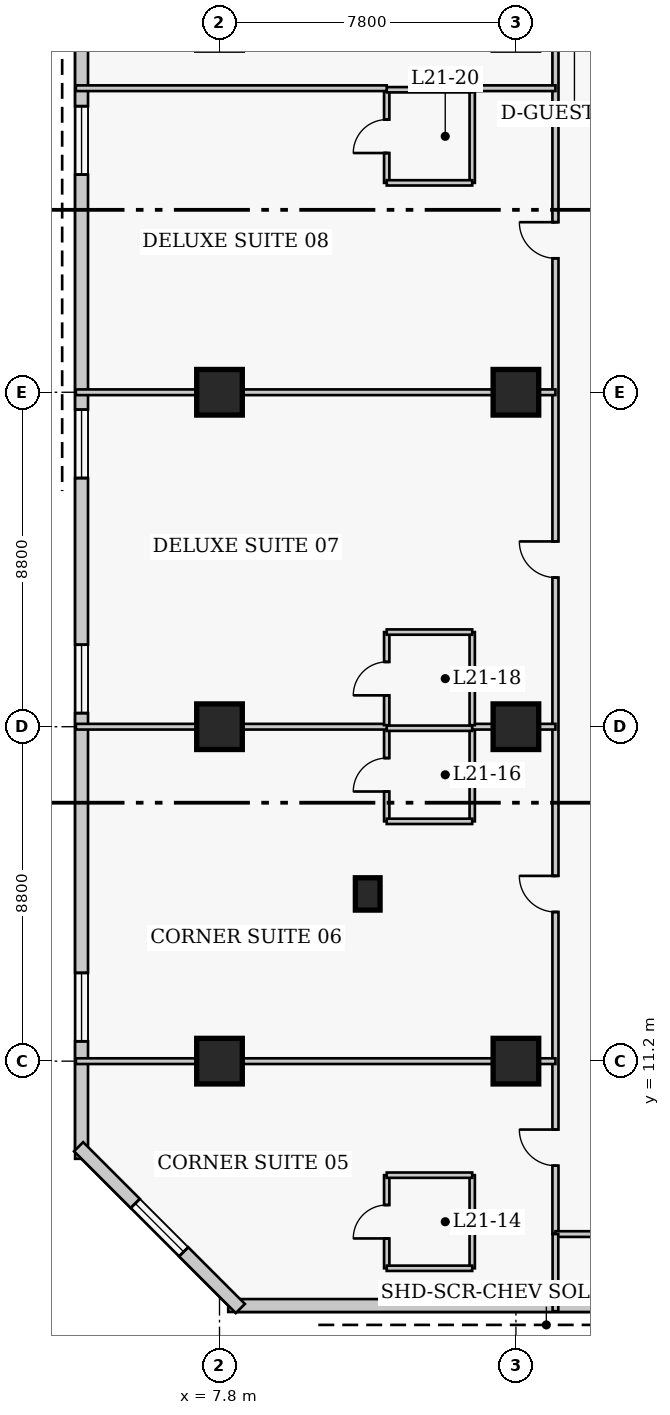
"""IFC4 building model, lengths in metres.
Left out: names, types, materials, properties, quantities, classifications, styles, units other than length and angle.
Written with IfcOpenShell. Run it as: python <this file> out.ifc"""

import sys

from ifc_helpers import new_model, si_unit, direction, frame, frame_2d, origin, origin_2d, place, context, subcontext, project, spatial, rectangle, extrude, element, fill, save


model = new_model("IFC4")
c1 = context("Model", 3, precision=1e-05, world=origin(), true_north=direction((0.0, 1.0)))
c2 = subcontext(c1, "Body", "Model", "MODEL_VIEW")
j1 = project(units=[si_unit("LENGTHUNIT", "METRE"), si_unit("PLANEANGLEUNIT", "RADIAN")], contexts=[c1])
p1 = place(None, origin())
s1 = spatial("IfcSite", under=j1, at=p1, CompositionType="ELEMENT")
p2 = place(p1, origin())
s2 = spatial("IfcBuilding", under=s1, at=p2, CompositionType="ELEMENT")
p3 = place(p2, frame((0.0, 0.0, 88.0)))
s3 = spatial("IfcBuildingStorey", under=s2, at=p3, CompositionType="ELEMENT", Elevation=88.0)
for number, where, z_axis, x_axis in (
    (1, (7.8, 11.2, 0.0), (0.0, 0.0, 1.0), (1.0, 0.0, 0.0)),
    (2, (7.8, 20.0, 0.0), (0.0, 0.0, 1.0), (1.0, 0.0, 0.0)),
    (3, (7.8, 28.8, 0.0), (0.0, 0.0, 1.0), (1.0, 0.0, 0.0)),
    (4, (15.6, 11.2, 0.0), (0.0, 0.0, 1.0), (1.0, 0.0, 0.0)),
    (5, (15.6, 20.0, 0.0), (0.0, 0.0, 1.0), (1.0, 0.0, 0.0)),
    (6, (15.6, 28.8, 0.0), (0.0, 0.0, 1.0), (1.0, 0.0, 0.0)),
):
    element("IfcColumn", number, at=place(p3, frame(where, z_axis=z_axis, x_axis=x_axis)), inside=s3, PredefinedType="COLUMN", context=c2, shape_type="SweptSolid", body=[
        extrude(rectangle(XDim=1.2, YDim=1.2, at=origin_2d()), origin(), (0.0, 0.0, 1.0), 3.8),
    ])
p4 = place(p3, frame((11.7, 15.6, 0.0), z_axis=(0.0, 0.0, 1.0), x_axis=(1.0, 0.0, 0.0)))
e7 = element("IfcColumn", 7, at=p4, inside=s3, PredefinedType="PILASTER", context=c2, shape_type="SweptSolid", body=[
    extrude(rectangle(XDim=0.65, YDim=0.85, at=origin_2d()), origin(), (0.0, 0.0, 1.0), 3.8),
])
p5 = place(p3, frame((8.03, 4.77, 0.0), z_axis=(0.0, 0.0, 1.0), x_axis=(1.0, 0.0, 0.0)))
e8 = element("IfcWall", 8, at=p5, inside=s3, PredefinedType="SOLIDWALL", context=c2, shape_type="SweptSolid", body=[
    extrude(rectangle(XDim=28.29, YDim=0.34, at=frame_2d((14.145, 0.0))), origin(), (0.0, 0.0, 1.0), 3.54),
])
p6 = place(p5, frame((12.595, 0.0, 0.85)))
e9 = element("IfcOpeningElement", 9, at=p6, cuts=e8, PredefinedType="OPENING", context=c2, shape_type="SweptSolid", body=[
    extrude(rectangle(XDim=1.8, YDim=1.8, at=frame_2d((0.9, 0.9))), frame((0.0, 0.18, 0.0), z_axis=(0.0, -1.0, 0.0), x_axis=(1.0, 0.0, 0.0)), (0.0, 0.0, 1.0), 0.36),
])
p7 = place(p5, frame((18.66, 0.0, 0.85)))
e10 = element("IfcOpeningElement", 10, at=p7, cuts=e8, PredefinedType="OPENING", context=c2, shape_type="SweptSolid", body=[
    extrude(rectangle(XDim=1.3, YDim=1.7, at=frame_2d((0.65, 0.85))), frame((0.0, 0.18, 0.0), z_axis=(0.0, -1.0, 0.0), x_axis=(1.0, 0.0, 0.0)), (0.0, 0.0, 1.0), 0.36),
])
p8 = place(p3, frame((4.17, 40.57, 0.0), z_axis=(0.0, 0.0, 1.0), x_axis=(0.0, -1.0, 0.0)))
e11 = element("IfcWall", 11, at=p8, inside=s3, PredefinedType="SOLIDWALL", context=c2, shape_type="SweptSolid", body=[
    extrude(rectangle(XDim=31.94, YDim=0.34, at=frame_2d((15.97, 0.0))), origin(), (0.0, 0.0, 1.0), 3.54),
])
p9 = place(p8, frame((4.242, 0.0, 0.85)))
e12 = element("IfcOpeningElement", 12, at=p9, cuts=e11, PredefinedType="OPENING", context=c2, shape_type="SweptSolid", body=[
    extrude(rectangle(XDim=1.8, YDim=1.8, at=frame_2d((0.9, 0.9))), frame((0.0, 0.18, 0.0), z_axis=(0.0, -1.0, 0.0), x_axis=(1.0, 0.0, 0.0)), (0.0, 0.0, 1.0), 0.36),
])
p10 = place(p8, frame((12.228, 0.0, 0.85)))
e13 = element("IfcOpeningElement", 13, at=p10, cuts=e11, PredefinedType="OPENING", context=c2, shape_type="SweptSolid", body=[
    extrude(rectangle(XDim=1.8, YDim=1.8, at=frame_2d((0.9, 0.9))), frame((0.0, 0.18, 0.0), z_axis=(0.0, -1.0, 0.0), x_axis=(1.0, 0.0, 0.0)), (0.0, 0.0, 1.0), 0.36),
])
p11 = place(p8, frame((18.413, 0.0, 0.85)))
e14 = element("IfcOpeningElement", 14, at=p11, cuts=e11, PredefinedType="OPENING", context=c2, shape_type="SweptSolid", body=[
    extrude(rectangle(XDim=1.8, YDim=1.8, at=frame_2d((0.9, 0.9))), frame((0.0, 0.18, 0.0), z_axis=(0.0, -1.0, 0.0), x_axis=(1.0, 0.0, 0.0)), (0.0, 0.0, 1.0), 0.36),
])
p12 = place(p8, frame((27.048, 0.0, 0.85)))
e15 = element("IfcOpeningElement", 15, at=p12, cuts=e11, PredefinedType="OPENING", context=c2, shape_type="SweptSolid", body=[
    extrude(rectangle(XDim=1.8, YDim=1.8, at=frame_2d((0.9, 0.9))), frame((0.0, 0.18, 0.0), z_axis=(0.0, -1.0, 0.0), x_axis=(1.0, 0.0, 0.0)), (0.0, 0.0, 1.0), 0.36),
])
p13 = place(p3, frame((4.092, 8.948, 0.0), z_axis=(0.0, 0.0, 1.0), x_axis=(0.707106781187, -0.707106781187, 0.0)))
e16 = element("IfcWall", 16, at=p13, inside=s3, PredefinedType="SOLIDWALL", context=c2, shape_type="SweptSolid", body=[
    extrude(rectangle(XDim=6.02, YDim=0.34, at=frame_2d((3.01, 0.0))), origin(), (0.0, 0.0, 1.0), 3.54),
])
p14 = place(p13, frame((2.11, 0.0, 0.85)))
e17 = element("IfcOpeningElement", 17, at=p14, cuts=e16, PredefinedType="OPENING", context=c2, shape_type="SweptSolid", body=[
    extrude(rectangle(XDim=1.8, YDim=1.8, at=frame_2d((0.9, 0.9))), frame((0.0, 0.18, 0.0), z_axis=(0.0, -1.0, 0.0), x_axis=(1.0, 0.0, 0.0)), (0.0, 0.0, 1.0), 0.36),
])
p15 = place(p3, frame((16.64, 6.65, 0.0), z_axis=(0.0, 0.0, 1.0), x_axis=(0.0, 1.0, 0.0)))
e18 = element("IfcWall", 18, at=p15, inside=s3, PredefinedType="PARTITIONING", context=c2, shape_type="SweptSolid", body=[
    extrude(rectangle(XDim=34.0, YDim=0.16, at=frame_2d((17.0, 0.0))), origin(), (0.0, 0.0, 1.0), 3.54),
])
p16 = place(p15, frame((1.8, 0.0, 0.0)))
e19 = element("IfcOpeningElement", 19, at=p16, cuts=e18, PredefinedType="OPENING", context=c2, shape_type="SweptSolid", body=[
    extrude(rectangle(XDim=0.95, YDim=2.1, at=frame_2d((0.475, 1.05))), frame((0.0, 0.09, 0.0), z_axis=(0.0, -1.0, 0.0), x_axis=(1.0, 0.0, 0.0)), (0.0, 0.0, 1.0), 0.18),
])
p17 = place(p15, frame((8.475, 0.0, 0.0)))
e20 = element("IfcOpeningElement", 20, at=p17, cuts=e18, PredefinedType="OPENING", context=c2, shape_type="SweptSolid", body=[
    extrude(rectangle(XDim=0.95, YDim=2.1, at=frame_2d((0.475, 1.05))), frame((0.0, 0.09, 0.0), z_axis=(0.0, -1.0, 0.0), x_axis=(1.0, 0.0, 0.0)), (0.0, 0.0, 1.0), 0.18),
])
p18 = place(p15, frame((17.275, 0.0, 0.0)))
e21 = element("IfcOpeningElement", 21, at=p18, cuts=e18, PredefinedType="OPENING", context=c2, shape_type="SweptSolid", body=[
    extrude(rectangle(XDim=0.95, YDim=2.1, at=frame_2d((0.475, 1.05))), frame((0.0, 0.09, 0.0), z_axis=(0.0, -1.0, 0.0), x_axis=(1.0, 0.0, 0.0)), (0.0, 0.0, 1.0), 0.18),
])
p19 = place(p15, frame((25.675, 0.0, 0.0)))
e22 = element("IfcOpeningElement", 22, at=p19, cuts=e18, PredefinedType="OPENING", context=c2, shape_type="SweptSolid", body=[
    extrude(rectangle(XDim=0.95, YDim=2.1, at=frame_2d((0.475, 1.05))), frame((0.0, 0.09, 0.0), z_axis=(0.0, -1.0, 0.0), x_axis=(1.0, 0.0, 0.0)), (0.0, 0.0, 1.0), 0.18),
])
p20 = place(p15, frame((32.56, 0.0, 0.0)))
e23 = element("IfcOpeningElement", 23, at=p20, cuts=e18, PredefinedType="OPENING", context=c2, shape_type="SweptSolid", body=[
    extrude(rectangle(XDim=1.0, YDim=2.15, at=frame_2d((0.5, 1.075))), frame((0.0, 0.09, 0.0), z_axis=(0.0, -1.0, 0.0), x_axis=(1.0, 0.0, 0.0)), (0.0, 0.0, 1.0), 0.18),
])
p21 = place(p3, frame((16.64, 6.65, 0.0), z_axis=(0.0, 0.0, 1.0), x_axis=(1.0, 0.0, 0.0)))
e24 = element("IfcWall", 24, at=p21, inside=s3, PredefinedType="PARTITIONING", context=c2, shape_type="SweptSolid", body=[
    extrude(rectangle(XDim=2.22, YDim=0.15, at=frame_2d((1.11, 0.0))), origin(), (0.0, 0.0, 1.0), 3.54),
])
p22 = place(p3, frame((16.64, 4.62, 0.0), z_axis=(0.0, 0.0, 1.0), x_axis=(0.0, 1.0, 0.0)))
e25 = element("IfcWall", 25, at=p22, inside=s3, PredefinedType="PARTITIONING", context=c2, shape_type="SweptSolid", body=[
    extrude(rectangle(XDim=2.03, YDim=0.15, at=frame_2d((1.015, 0.0))), origin(), (0.0, 0.0, 1.0), 3.54),
])
p23 = place(p3, frame((12.2, 5.75, 0.0), z_axis=(0.0, 0.0, 1.0), x_axis=(0.0, 1.0, 0.0)))
e26 = element("IfcWall", 26, at=p23, inside=s3, PredefinedType="PLUMBINGWALL", context=c2, shape_type="SweptSolid", body=[
    extrude(rectangle(XDim=2.45, YDim=0.14, at=frame_2d((1.225, 0.0))), origin(), (0.0, 0.0, 1.0), 3.54),
])
p24 = place(p23, frame((0.785, 0.0, 0.0)))
e27 = element("IfcOpeningElement", 27, at=p24, cuts=e26, PredefinedType="OPENING", context=c2, shape_type="SweptSolid", body=[
    extrude(rectangle(XDim=0.88, YDim=2.05, at=frame_2d((0.44, 1.025))), frame((0.0, 0.08, 0.0), z_axis=(0.0, -1.0, 0.0), x_axis=(1.0, 0.0, 0.0)), (0.0, 0.0, 1.0), 0.16),
])
p25 = place(p3, frame((14.45, 5.75, 0.0), z_axis=(0.0, 0.0, 1.0), x_axis=(0.0, 1.0, 0.0)))
e28 = element("IfcWall", 28, at=p25, inside=s3, PredefinedType="PLUMBINGWALL", context=c2, shape_type="SweptSolid", body=[
    extrude(rectangle(XDim=2.45, YDim=0.14, at=frame_2d((1.225, 0.0))), origin(), (0.0, 0.0, 1.0), 3.54),
])
for number, where, z_axis, x_axis in (
    (29, (12.2, 5.75, 0.0), (0.0, 0.0, 1.0), (1.0, 0.0, 0.0)),
    (30, (12.2, 8.2, 0.0), (0.0, 0.0, 1.0), (1.0, 0.0, 0.0)),
):
    element("IfcWall", number, at=place(p3, frame(where, z_axis=z_axis, x_axis=x_axis)), inside=s3, PredefinedType="PLUMBINGWALL", context=c2, shape_type="SweptSolid", body=[
        extrude(rectangle(XDim=2.25, YDim=0.14, at=frame_2d((1.125, 0.0))), origin(), (0.0, 0.0, 1.0), 3.54),
    ])
p26 = place(p3, frame((4.02, 11.2, 0.0), z_axis=(0.0, 0.0, 1.0), x_axis=(1.0, 0.0, 0.0)))
e31 = element("IfcWall", 31, at=p26, inside=s3, PredefinedType="PARTITIONING", context=c2, shape_type="SweptSolid", body=[
    extrude(rectangle(XDim=12.62, YDim=0.15, at=frame_2d((6.31, 0.0))), origin(), (0.0, 0.0, 1.0), 2.679),
])
p27 = place(p3, frame((12.2, 17.51, 0.0), z_axis=(0.0, 0.0, 1.0), x_axis=(0.0, 1.0, 0.0)))
e32 = element("IfcWall", 32, at=p27, inside=s3, PredefinedType="PLUMBINGWALL", context=c2, shape_type="SweptSolid", body=[
    extrude(rectangle(XDim=2.45, YDim=0.14, at=frame_2d((1.225, 0.0))), origin(), (0.0, 0.0, 1.0), 3.54),
])
p28 = place(p27, frame((0.785, 0.0, 0.0)))
e33 = element("IfcOpeningElement", 33, at=p28, cuts=e32, PredefinedType="OPENING", context=c2, shape_type="SweptSolid", body=[
    extrude(rectangle(XDim=0.88, YDim=2.05, at=frame_2d((0.44, 1.025))), frame((0.0, 0.08, 0.0), z_axis=(0.0, -1.0, 0.0), x_axis=(1.0, 0.0, 0.0)), (0.0, 0.0, 1.0), 0.16),
])
p29 = place(p3, frame((14.45, 17.51, 0.0), z_axis=(0.0, 0.0, 1.0), x_axis=(0.0, 1.0, 0.0)))
e34 = element("IfcWall", 34, at=p29, inside=s3, PredefinedType="PLUMBINGWALL", context=c2, shape_type="SweptSolid", body=[
    extrude(rectangle(XDim=2.45, YDim=0.14, at=frame_2d((1.225, 0.0))), origin(), (0.0, 0.0, 1.0), 3.54),
])
p30 = place(p3, frame((12.2, 17.51, 0.0), z_axis=(0.0, 0.0, 1.0), x_axis=(1.0, 0.0, 0.0)))
e35 = element("IfcWall", 35, at=p30, inside=s3, PredefinedType="PLUMBINGWALL", context=c2, shape_type="SweptSolid", body=[
    extrude(rectangle(XDim=2.25, YDim=0.14, at=frame_2d((1.125, 0.0))), origin(), (0.0, 0.0, 1.0), 3.54),
])
p31 = place(p3, frame((12.2, 19.96, 0.0), z_axis=(0.0, 0.0, 1.0), x_axis=(1.0, 0.0, 0.0)))
e36 = element("IfcWall", 36, at=p31, inside=s3, PredefinedType="PLUMBINGWALL", context=c2, shape_type="SweptSolid", body=[
    extrude(rectangle(XDim=2.25, YDim=0.14, at=frame_2d((1.125, 0.0))), origin(), (0.0, 0.0, 1.0), 2.679),
])
p32 = place(p3, frame((4.02, 20.0, 0.0), z_axis=(0.0, 0.0, 1.0), x_axis=(1.0, 0.0, 0.0)))
e37 = element("IfcWall", 37, at=p32, inside=s3, PredefinedType="PARTITIONING", context=c2, shape_type="SweptSolid", body=[
    extrude(rectangle(XDim=8.18, YDim=0.15, at=frame_2d((4.09, 0.0))), origin(), (0.0, 0.0, 1.0), 2.679),
])
p33 = place(p3, frame((14.45, 20.0, 0.0), z_axis=(0.0, 0.0, 1.0), x_axis=(1.0, 0.0, 0.0)))
e38 = element("IfcWall", 38, at=p33, inside=s3, PredefinedType="PARTITIONING", context=c2, shape_type="SweptSolid", body=[
    extrude(rectangle(XDim=2.19, YDim=0.15, at=frame_2d((1.095, 0.0))), origin(), (0.0, 0.0, 1.0), 2.679),
])
p34 = place(p3, frame((12.2, 20.04, 0.0), z_axis=(0.0, 0.0, 1.0), x_axis=(0.0, 1.0, 0.0)))
e39 = element("IfcWall", 39, at=p34, inside=s3, PredefinedType="PLUMBINGWALL", context=c2, shape_type="SweptSolid", body=[
    extrude(rectangle(XDim=2.45, YDim=0.14, at=frame_2d((1.225, 0.0))), origin(), (0.0, 0.0, 1.0), 3.54),
])
p35 = place(p34, frame((0.785, 0.0, 0.0)))
e40 = element("IfcOpeningElement", 40, at=p35, cuts=e39, PredefinedType="OPENING", context=c2, shape_type="SweptSolid", body=[
    extrude(rectangle(XDim=0.88, YDim=2.05, at=frame_2d((0.44, 1.025))), frame((0.0, 0.08, 0.0), z_axis=(0.0, -1.0, 0.0), x_axis=(1.0, 0.0, 0.0)), (0.0, 0.0, 1.0), 0.16),
])
p36 = place(p3, frame((14.45, 20.04, 0.0), z_axis=(0.0, 0.0, 1.0), x_axis=(0.0, 1.0, 0.0)))
e41 = element("IfcWall", 41, at=p36, inside=s3, PredefinedType="PLUMBINGWALL", context=c2, shape_type="SweptSolid", body=[
    extrude(rectangle(XDim=2.45, YDim=0.14, at=frame_2d((1.225, 0.0))), origin(), (0.0, 0.0, 1.0), 3.54),
])
p37 = place(p3, frame((12.2, 22.49, 0.0), z_axis=(0.0, 0.0, 1.0), x_axis=(1.0, 0.0, 0.0)))
e42 = element("IfcWall", 42, at=p37, inside=s3, PredefinedType="PLUMBINGWALL", context=c2, shape_type="SweptSolid", body=[
    extrude(rectangle(XDim=2.25, YDim=0.14, at=frame_2d((1.125, 0.0))), origin(), (0.0, 0.0, 1.0), 3.54),
])
p38 = place(p3, frame((4.02, 28.8, 0.0), z_axis=(0.0, 0.0, 1.0), x_axis=(1.0, 0.0, 0.0)))
e43 = element("IfcWall", 43, at=p38, inside=s3, PredefinedType="PARTITIONING", context=c2, shape_type="SweptSolid", body=[
    extrude(rectangle(XDim=12.62, YDim=0.15, at=frame_2d((6.31, 0.0))), origin(), (0.0, 0.0, 1.0), 2.679),
])
p39 = place(p3, frame((12.2, 34.31, 0.0), z_axis=(0.0, 0.0, 1.0), x_axis=(0.0, 1.0, 0.0)))
e44 = element("IfcWall", 44, at=p39, inside=s3, PredefinedType="PLUMBINGWALL", context=c2, shape_type="SweptSolid", body=[
    extrude(rectangle(XDim=2.45, YDim=0.14, at=frame_2d((1.225, 0.0))), origin(), (0.0, 0.0, 1.0), 3.54),
])
p40 = place(p39, frame((0.785, 0.0, 0.0)))
e45 = element("IfcOpeningElement", 45, at=p40, cuts=e44, PredefinedType="OPENING", context=c2, shape_type="SweptSolid", body=[
    extrude(rectangle(XDim=0.88, YDim=2.05, at=frame_2d((0.44, 1.025))), frame((0.0, 0.08, 0.0), z_axis=(0.0, -1.0, 0.0), x_axis=(1.0, 0.0, 0.0)), (0.0, 0.0, 1.0), 0.16),
])
p41 = place(p3, frame((14.45, 34.31, 0.0), z_axis=(0.0, 0.0, 1.0), x_axis=(0.0, 1.0, 0.0)))
e46 = element("IfcWall", 46, at=p41, inside=s3, PredefinedType="PLUMBINGWALL", context=c2, shape_type="SweptSolid", body=[
    extrude(rectangle(XDim=2.45, YDim=0.14, at=frame_2d((1.225, 0.0))), origin(), (0.0, 0.0, 1.0), 3.54),
])
for number, where, z_axis, x_axis in (
    (47, (12.2, 34.31, 0.0), (0.0, 0.0, 1.0), (1.0, 0.0, 0.0)),
    (48, (12.2, 36.76, 0.0), (0.0, 0.0, 1.0), (1.0, 0.0, 0.0)),
):
    element("IfcWall", number, at=place(p3, frame(where, z_axis=z_axis, x_axis=x_axis)), inside=s3, PredefinedType="PLUMBINGWALL", context=c2, shape_type="SweptSolid", body=[
        extrude(rectangle(XDim=2.25, YDim=0.14, at=frame_2d((1.125, 0.0))), origin(), (0.0, 0.0, 1.0), 3.54),
    ])
p42 = place(p3, frame((4.02, 36.8, 0.0), z_axis=(0.0, 0.0, 1.0), x_axis=(1.0, 0.0, 0.0)))
e49 = element("IfcWall", 49, at=p42, inside=s3, PredefinedType="PARTITIONING", context=c2, shape_type="SweptSolid", body=[
    extrude(rectangle(XDim=8.18, YDim=0.15, at=frame_2d((4.09, 0.0))), origin(), (0.0, 0.0, 1.0), 3.54),
])
p43 = place(p3, frame((14.45, 36.8, 0.0), z_axis=(0.0, 0.0, 1.0), x_axis=(1.0, 0.0, 0.0)))
e50 = element("IfcWall", 50, at=p43, inside=s3, PredefinedType="PARTITIONING", context=c2, shape_type="SweptSolid", body=[
    extrude(rectangle(XDim=2.19, YDim=0.15, at=frame_2d((1.095, 0.0))), origin(), (0.0, 0.0, 1.0), 3.54),
])
p44 = place(p9, origin())
e51 = element("IfcWindow", 51, at=p44, inside=s3, PartitioningType="SINGLE_PANEL", PredefinedType="WINDOW", context=c2, shape_type="SweptSolid", body=[
    extrude(rectangle(XDim=1.8, YDim=1.8, at=frame_2d((0.9, 0.9))), frame((0.0, 0.03, 0.0), z_axis=(0.0, -1.0, 0.0), x_axis=(1.0, 0.0, 0.0)), (0.0, 0.0, 1.0), 0.06),
])
fill(e12, e51)
p45 = place(p10, origin())
e52 = element("IfcWindow", 52, at=p45, inside=s3, PartitioningType="SINGLE_PANEL", PredefinedType="WINDOW", context=c2, shape_type="SweptSolid", body=[
    extrude(rectangle(XDim=1.8, YDim=1.8, at=frame_2d((0.9, 0.9))), frame((0.0, 0.03, 0.0), z_axis=(0.0, -1.0, 0.0), x_axis=(1.0, 0.0, 0.0)), (0.0, 0.0, 1.0), 0.06),
])
fill(e13, e52)
p46 = place(p11, origin())
e53 = element("IfcWindow", 53, at=p46, inside=s3, PartitioningType="SINGLE_PANEL", PredefinedType="WINDOW", context=c2, shape_type="SweptSolid", body=[
    extrude(rectangle(XDim=1.8, YDim=1.8, at=frame_2d((0.9, 0.9))), frame((0.0, 0.03, 0.0), z_axis=(0.0, -1.0, 0.0), x_axis=(1.0, 0.0, 0.0)), (0.0, 0.0, 1.0), 0.06),
])
fill(e14, e53)
p47 = place(p12, origin())
e54 = element("IfcWindow", 54, at=p47, inside=s3, PartitioningType="SINGLE_PANEL", PredefinedType="WINDOW", context=c2, shape_type="SweptSolid", body=[
    extrude(rectangle(XDim=1.8, YDim=1.8, at=frame_2d((0.9, 0.9))), frame((0.0, 0.03, 0.0), z_axis=(0.0, -1.0, 0.0), x_axis=(1.0, 0.0, 0.0)), (0.0, 0.0, 1.0), 0.06),
])
fill(e15, e54)
p48 = place(p14, origin())
e55 = element("IfcWindow", 55, at=p48, inside=s3, PartitioningType="SINGLE_PANEL", PredefinedType="WINDOW", context=c2, shape_type="SweptSolid", body=[
    extrude(rectangle(XDim=1.8, YDim=1.8, at=frame_2d((0.9, 0.9))), frame((0.0, 0.03, 0.0), z_axis=(0.0, -1.0, 0.0), x_axis=(1.0, 0.0, 0.0)), (0.0, 0.0, 1.0), 0.06),
])
fill(e17, e55)
p49 = place(p24, origin())
e56 = element("IfcDoor", 56, at=p49, inside=s3, OperationType="SINGLE_SWING_LEFT", PredefinedType="DOOR", context=c2, shape_type="SweptSolid", body=[
    extrude(rectangle(XDim=0.88, YDim=2.05, at=frame_2d((0.44, 1.025))), frame((0.0, 0.025, 0.0), z_axis=(0.0, -1.0, 0.0), x_axis=(1.0, 0.0, 0.0)), (0.0, 0.0, 1.0), 0.05),
])
fill(e27, e56)
p50 = place(p16, origin())
e57 = element("IfcDoor", 57, at=p50, inside=s3, OperationType="SINGLE_SWING_RIGHT", PredefinedType="DOOR", context=c2, shape_type="SweptSolid", body=[
    extrude(rectangle(XDim=0.95, YDim=2.1, at=frame_2d((0.475, 1.05))), frame((0.0, 0.025, 0.0), z_axis=(0.0, -1.0, 0.0), x_axis=(1.0, 0.0, 0.0)), (0.0, 0.0, 1.0), 0.05),
])
fill(e19, e57)
p51 = place(p28, origin())
e58 = element("IfcDoor", 58, at=p51, inside=s3, OperationType="SINGLE_SWING_LEFT", PredefinedType="DOOR", context=c2, shape_type="SweptSolid", body=[
    extrude(rectangle(XDim=0.88, YDim=2.05, at=frame_2d((0.44, 1.025))), frame((0.0, 0.025, 0.0), z_axis=(0.0, -1.0, 0.0), x_axis=(1.0, 0.0, 0.0)), (0.0, 0.0, 1.0), 0.05),
])
fill(e33, e58)
p52 = place(p17, origin())
e59 = element("IfcDoor", 59, at=p52, inside=s3, OperationType="SINGLE_SWING_RIGHT", PredefinedType="DOOR", context=c2, shape_type="SweptSolid", body=[
    extrude(rectangle(XDim=0.95, YDim=2.1, at=frame_2d((0.475, 1.05))), frame((0.0, 0.025, 0.0), z_axis=(0.0, -1.0, 0.0), x_axis=(1.0, 0.0, 0.0)), (0.0, 0.0, 1.0), 0.05),
])
fill(e20, e59)
p53 = place(p35, origin())
e60 = element("IfcDoor", 60, at=p53, inside=s3, OperationType="SINGLE_SWING_LEFT", PredefinedType="DOOR", context=c2, shape_type="SweptSolid", body=[
    extrude(rectangle(XDim=0.88, YDim=2.05, at=frame_2d((0.44, 1.025))), frame((0.0, 0.025, 0.0), z_axis=(0.0, -1.0, 0.0), x_axis=(1.0, 0.0, 0.0)), (0.0, 0.0, 1.0), 0.05),
])
fill(e40, e60)
p54 = place(p18, origin())
e61 = element("IfcDoor", 61, at=p54, inside=s3, OperationType="SINGLE_SWING_RIGHT", PredefinedType="DOOR", context=c2, shape_type="SweptSolid", body=[
    extrude(rectangle(XDim=0.95, YDim=2.1, at=frame_2d((0.475, 1.05))), frame((0.0, 0.025, 0.0), z_axis=(0.0, -1.0, 0.0), x_axis=(1.0, 0.0, 0.0)), (0.0, 0.0, 1.0), 0.05),
])
fill(e21, e61)
p55 = place(p40, origin())
e62 = element("IfcDoor", 62, at=p55, inside=s3, OperationType="SINGLE_SWING_LEFT", PredefinedType="DOOR", context=c2, shape_type="SweptSolid", body=[
    extrude(rectangle(XDim=0.88, YDim=2.05, at=frame_2d((0.44, 1.025))), frame((0.0, 0.025, 0.0), z_axis=(0.0, -1.0, 0.0), x_axis=(1.0, 0.0, 0.0)), (0.0, 0.0, 1.0), 0.05),
])
fill(e45, e62)
p56 = place(p19, origin())
e63 = element("IfcDoor", 63, at=p56, inside=s3, OperationType="SINGLE_SWING_RIGHT", PredefinedType="DOOR", context=c2, shape_type="SweptSolid", body=[
    extrude(rectangle(XDim=0.95, YDim=2.1, at=frame_2d((0.475, 1.05))), frame((0.0, 0.025, 0.0), z_axis=(0.0, -1.0, 0.0), x_axis=(1.0, 0.0, 0.0)), (0.0, 0.0, 1.0), 0.05),
])
fill(e22, e63)
save(model, sys.argv[1])
